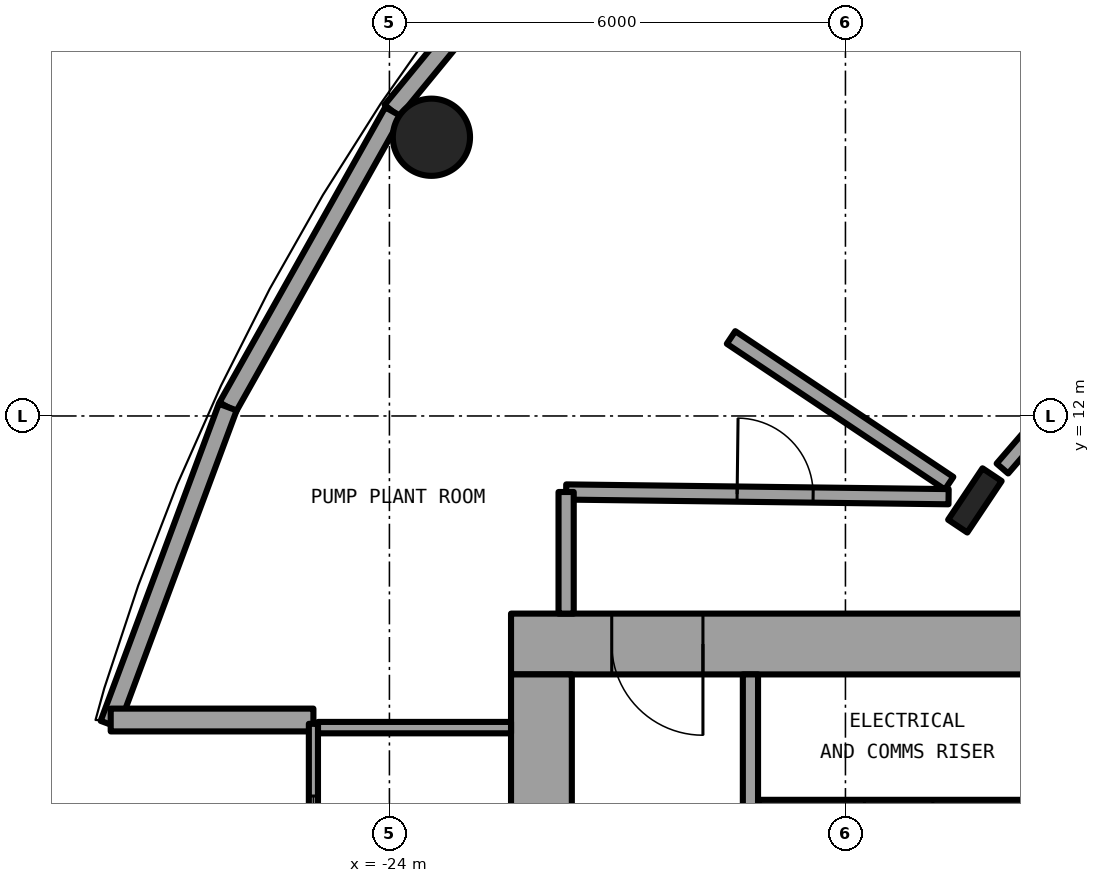
"""IFC4 building model, lengths in metres.
Left out: names, types, materials, properties, quantities, classifications, styles, units other than length and angle.
Written with IfcOpenShell. Run it as: python <this file> out.ifc"""

import sys

from ifc_helpers import new_model, si_unit, direction, frame, frame_2d, origin, origin_2d, place, context, subcontext, project, spatial, rectangle, hollow_circle, i_section, extrude, element, fill, save


model = new_model("IFC4")
c1 = context("Model", 3, precision=1e-05, world=origin(), true_north=direction((0.0, 1.0)))
c2 = subcontext(c1, "Body", "Model", "MODEL_VIEW")
j1 = project(units=[si_unit("LENGTHUNIT", "METRE"), si_unit("PLANEANGLEUNIT", "RADIAN")], contexts=[c1])
p1 = place(None, origin())
s1 = spatial("IfcSite", under=j1, at=p1, CompositionType="ELEMENT")
p2 = place(p1, origin())
s2 = spatial("IfcBuilding", under=s1, at=p2, CompositionType="ELEMENT")
p3 = place(p2, frame((0.0, 0.0, 18.3)))
s3 = spatial("IfcBuildingStorey", under=s2, at=p3, CompositionType="ELEMENT", Elevation=18.3)
p4 = place(p3, frame((-23.448, 15.667, 0.0), z_axis=(0.0, 0.0, 1.0), x_axis=(1.0, 0.0, 0.0)))
e1 = element("IfcColumn", 1, at=p4, inside=s3, PredefinedType="COLUMN", context=c2, shape_type="SweptSolid", body=[
    extrude(hollow_circle(Radius=0.508, WallThickness=0.05, at=origin_2d()), origin(), (0.0, 0.0, 1.0), 4.5),
])
p5 = place(p3, frame((-16.297, 10.889, 0.0), z_axis=(0.0, 0.0, 1.0), x_axis=(-0.831469612303, 0.55557023302, 0.0)))
e2 = element("IfcColumn", 2, at=p5, inside=s3, PredefinedType="COLUMN", context=c2, shape_type="SweptSolid", body=[
    extrude(i_section(OverallWidth=0.303, OverallDepth=0.814, WebThickness=0.021, FlangeThickness=0.04, FilletRadius=0.03, at=origin_2d()), origin(), (0.0, 0.0, 1.0), 4.5),
])
p6 = place(p3, frame((-20.382, 20.382, 0.0), z_axis=(0.0, 0.0, 1.0), x_axis=(-0.634403999748, -0.773001659186, 0.0)))
e3 = element("IfcWall", 3, at=p6, inside=s3, PredefinedType="SOLIDWALL", context=c2, shape_type="SweptSolid", body=[
    extrude(rectangle(XDim=5.651, YDim=0.25, at=frame_2d((2.825, 0.0))), origin(), (0.0, 0.0, 1.0), 4.15),
])
p7 = place(p3, frame((-23.946, 16.0, 0.0), z_axis=(0.0, 0.0, 1.0), x_axis=(-0.489696356642, -0.871893042919, 0.0)))
e4 = element("IfcWall", 4, at=p7, inside=s3, PredefinedType="SOLIDWALL", context=c2, shape_type="SweptSolid", body=[
    extrude(rectangle(XDim=4.454, YDim=0.25, at=frame_2d((2.227, 0.0))), origin(), (0.0, 0.0, 1.0), 4.15),
])
p8 = place(p3, frame((-26.127, 12.117, 0.0), z_axis=(0.0, 0.0, 1.0), x_axis=(-0.349247811493, -0.937030397675, 0.0)))
e5 = element("IfcWall", 5, at=p8, inside=s3, PredefinedType="SOLIDWALL", context=c2, shape_type="SweptSolid", body=[
    extrude(rectangle(XDim=4.452, YDim=0.25, at=frame_2d((2.226, 0.0))), origin(), (0.0, 0.0, 1.0), 4.15),
])
p9 = place(p3, frame((-25.0, 8.0, 0.0), z_axis=(0.0, 0.0, 1.0), x_axis=(-1.0, 0.0, 0.0)))
e6 = element("IfcWall", 6, at=p9, inside=s3, PredefinedType="SOLIDWALL", context=c2, shape_type="SweptSolid", body=[
    extrude(rectangle(XDim=2.667, YDim=0.3, at=frame_2d((1.333, 0.0))), origin(), (0.0, 0.0, 1.0), 4.15),
])
p10 = place(p3, frame((-8.2, 9.0, 0.0), z_axis=(0.0, 0.0, 1.0), x_axis=(-1.0, 0.0, 0.0)))
e7 = element("IfcWall", 7, at=p10, inside=s3, PredefinedType="SHEAR", context=c2, shape_type="SweptSolid", body=[
    extrude(rectangle(XDim=14.2, YDim=0.8, at=frame_2d((7.1, 0.0))), origin(), (0.0, 0.0, 1.0), 4.5),
])
p11 = place(p10, frame((11.675, 0.0, 0.0)))
e8 = element("IfcOpeningElement", 8, at=p11, cuts=e7, PredefinedType="OPENING", context=c2, shape_type="SweptSolid", body=[
    extrude(rectangle(XDim=1.2, YDim=2.3, at=frame_2d((0.6, 1.15))), frame((0.0, 0.41, 0.0), z_axis=(0.0, -1.0, 0.0), x_axis=(1.0, 0.0, 0.0)), (0.0, 0.0, 1.0), 0.82),
])
p12 = place(p3, frame((-22.0, -8.6, 0.0), z_axis=(0.0, 0.0, 1.0), x_axis=(0.0, 1.0, 0.0)))
e9 = element("IfcWall", 9, at=p12, inside=s3, PredefinedType="SHEAR", context=c2, shape_type="SweptSolid", body=[
    extrude(rectangle(XDim=17.2, YDim=0.8, at=frame_2d((8.6, 0.0))), origin(), (0.0, 0.0, 1.0), 4.5),
])
p13 = place(p12, frame((7.7, 0.0, 0.0)))
e10 = element("IfcOpeningElement", 10, at=p13, cuts=e9, PredefinedType="OPENING", context=c2, shape_type="SweptSolid", body=[
    extrude(rectangle(XDim=1.8, YDim=2.3, at=frame_2d((0.9, 1.15))), frame((0.0, 0.41, 0.0), z_axis=(0.0, -1.0, 0.0), x_axis=(1.0, 0.0, 0.0)), (0.0, 0.0, 1.0), 0.82),
])
p14 = place(p3, frame((-19.25, 8.6, 0.0), z_axis=(0.0, 0.0, 1.0), x_axis=(0.0, -1.0, 0.0)))
e11 = element("IfcWall", 11, at=p14, inside=s3, PredefinedType="SOLIDWALL", context=c2, shape_type="SweptSolid", body=[
    extrude(rectangle(XDim=7.025, YDim=0.2, at=frame_2d((3.513, 0.0))), origin(), (0.0, 0.0, 1.0), 4.15),
])
p15 = place(p14, frame((2.35, 0.0, 0.0)))
e12 = element("IfcOpeningElement", 12, at=p15, cuts=e11, PredefinedType="OPENING", context=c2, shape_type="SweptSolid", body=[
    extrude(rectangle(XDim=1.1, YDim=2.3, at=frame_2d((0.55, 1.15))), frame((0.0, 0.11, 0.0), z_axis=(0.0, -1.0, 0.0), x_axis=(1.0, 0.0, 0.0)), (0.0, 0.0, 1.0), 0.22),
])
p16 = place(p3, frame((-15.45, 6.875, 0.0), z_axis=(0.0, 0.0, 1.0), x_axis=(-1.0, 0.0, 0.0)))
e13 = element("IfcWall", 13, at=p16, inside=s3, PredefinedType="PARTITIONING", context=c2, shape_type="SweptSolid", body=[
    extrude(rectangle(XDim=3.7, YDim=0.15, at=frame_2d((1.85, 0.0))), origin(), (0.0, 0.0, 1.0), 4.15),
])
p17 = place(p16, frame((1.4, 0.0, 0.0)))
e14 = element("IfcOpeningElement", 14, at=p17, cuts=e13, PredefinedType="OPENING", context=c2, shape_type="SweptSolid", body=[
    extrude(rectangle(XDim=0.9, YDim=2.3, at=frame_2d((0.45, 1.15))), frame((0.0, 0.085, 0.0), z_axis=(0.0, -1.0, 0.0), x_axis=(1.0, 0.0, 0.0)), (0.0, 0.0, 1.0), 0.17),
])
p18 = place(p3, frame((-22.4, 7.9, 0.0), z_axis=(0.0, 0.0, 1.0), x_axis=(-1.0, 0.0, 0.0)))
e15 = element("IfcWall", 15, at=p18, inside=s3, PredefinedType="PARTITIONING", context=c2, shape_type="SweptSolid", body=[
    extrude(rectangle(XDim=2.54, YDim=0.15, at=frame_2d((1.27, 0.0))), origin(), (0.0, 0.0, 1.0), 4.15),
])
p19 = place(p3, frame((-25.0, 7.95, 0.0), z_axis=(0.0, 0.0, 1.0), x_axis=(0.0, -1.0, 0.0)))
e16 = element("IfcWall", 16, at=p19, inside=s3, PredefinedType="PARTITIONING", context=c2, shape_type="SweptSolid", body=[
    extrude(rectangle(XDim=15.9, YDim=0.12, at=frame_2d((7.95, 0.0))), origin(), (0.0, 0.0, 1.0), 4.15),
])
p20 = place(p19, frame((0.95, 0.0, 0.1)))
e17 = element("IfcOpeningElement", 17, at=p20, cuts=e16, PredefinedType="OPENING", context=c2, shape_type="SweptSolid", body=[
    extrude(rectangle(XDim=14.0, YDim=3.8, at=frame_2d((7.0, 1.9))), frame((0.0, 0.07, 0.0), z_axis=(0.0, -1.0, 0.0), x_axis=(1.0, 0.0, 0.0)), (0.0, 0.0, 1.0), 0.14),
])
p21 = place(p3, frame((-19.505, 13.033, 0.0), z_axis=(0.0, 0.0, 1.0), x_axis=(0.831331256958, -0.555777240632, 0.0)))
e18 = element("IfcWall", 18, at=p21, inside=s3, PredefinedType="PARTITIONING", context=c2, shape_type="SweptSolid", body=[
    extrude(rectangle(XDim=3.451, YDim=0.2, at=frame_2d((1.726, 0.0))), origin(), (0.0, 0.0, 1.0), 3.23),
])
p22 = place(p3, frame((-21.675, 11.0, 0.0), z_axis=(0.0, 0.0, 1.0), x_axis=(0.999924074118, -0.012322580895, 0.0)))
e19 = element("IfcWall", 19, at=p22, inside=s3, PredefinedType="PARTITIONING", context=c2, shape_type="SweptSolid", body=[
    extrude(rectangle(XDim=5.032, YDim=0.2, at=frame_2d((2.516, 0.0))), origin(), (0.0, 0.0, 1.0), 4.15),
])
p23 = place(p22, frame((2.25, 0.0, 0.0)))
e20 = element("IfcOpeningElement", 20, at=p23, cuts=e19, PredefinedType="OPENING", context=c2, shape_type="SweptSolid", body=[
    extrude(rectangle(XDim=1.0, YDim=2.3, at=frame_2d((0.5, 1.15))), frame((0.0, 0.11, 0.0), z_axis=(0.0, -1.0, 0.0), x_axis=(1.0, 0.0, 0.0)), (0.0, 0.0, 1.0), 0.22),
])
p24 = place(p3, frame((-15.935, 11.309, 0.0), z_axis=(0.0, 0.0, 1.0), x_axis=(0.653128497371, 0.757247097005, 0.0)))
e21 = element("IfcWall", 21, at=p24, inside=s3, PredefinedType="PARTITIONING", context=c2, shape_type="SweptSolid", body=[
    extrude(rectangle(XDim=4.244, YDim=0.2, at=frame_2d((2.122, 0.0))), origin(), (0.0, 0.0, 1.0), 3.73),
])
p25 = place(p3, frame((-21.675, 9.4, 0.0), z_axis=(0.0, 0.0, 1.0), x_axis=(0.0, 1.0, 0.0)))
e22 = element("IfcWall", 22, at=p25, inside=s3, PredefinedType="PARTITIONING", context=c2, shape_type="SweptSolid", body=[
    extrude(rectangle(XDim=1.6, YDim=0.2, at=frame_2d((0.8, 0.0))), origin(), (0.0, 0.0, 1.0), 4.15),
])
p26 = place(p17, origin())
e23 = element("IfcDoor", 23, at=p26, inside=s3, OperationType="SINGLE_SWING_LEFT", PredefinedType="DOOR", context=c2, shape_type="SweptSolid", body=[
    extrude(rectangle(XDim=0.9, YDim=2.3, at=frame_2d((0.45, 1.15))), frame((0.0, 0.025, 0.0), z_axis=(0.0, -1.0, 0.0), x_axis=(1.0, 0.0, 0.0)), (0.0, 0.0, 1.0), 0.05),
])
fill(e14, e23)
p27 = place(p11, origin())
e24 = element("IfcDoor", 24, at=p27, inside=s3, OperationType="SINGLE_SWING_LEFT", PredefinedType="DOOR", context=c2, shape_type="SweptSolid", body=[
    extrude(rectangle(XDim=1.2, YDim=2.3, at=frame_2d((0.6, 1.15))), frame((0.0, 0.025, 0.0), z_axis=(0.0, -1.0, 0.0), x_axis=(1.0, 0.0, 0.0)), (0.0, 0.0, 1.0), 0.05),
])
fill(e8, e24)
p28 = place(p20, origin())
e25 = element("IfcWindow", 25, at=p28, inside=s3, PartitioningType="SINGLE_PANEL", PredefinedType="WINDOW", context=c2, shape_type="SweptSolid", body=[
    extrude(rectangle(XDim=14.0, YDim=3.8, at=frame_2d((7.0, 1.9))), frame((0.0, 0.03, 0.0), z_axis=(0.0, -1.0, 0.0), x_axis=(1.0, 0.0, 0.0)), (0.0, 0.0, 1.0), 0.06),
])
fill(e17, e25)
p29 = place(p23, origin())
e26 = element("IfcDoor", 26, at=p29, inside=s3, OperationType="SINGLE_SWING_RIGHT", PredefinedType="DOOR", context=c2, shape_type="SweptSolid", body=[
    extrude(rectangle(XDim=1.0, YDim=2.3, at=frame_2d((0.5, 1.15))), frame((0.0, 0.025, 0.0), z_axis=(0.0, -1.0, 0.0), x_axis=(1.0, 0.0, 0.0)), (0.0, 0.0, 1.0), 0.05),
])
fill(e20, e26)
save(model, sys.argv[1])
